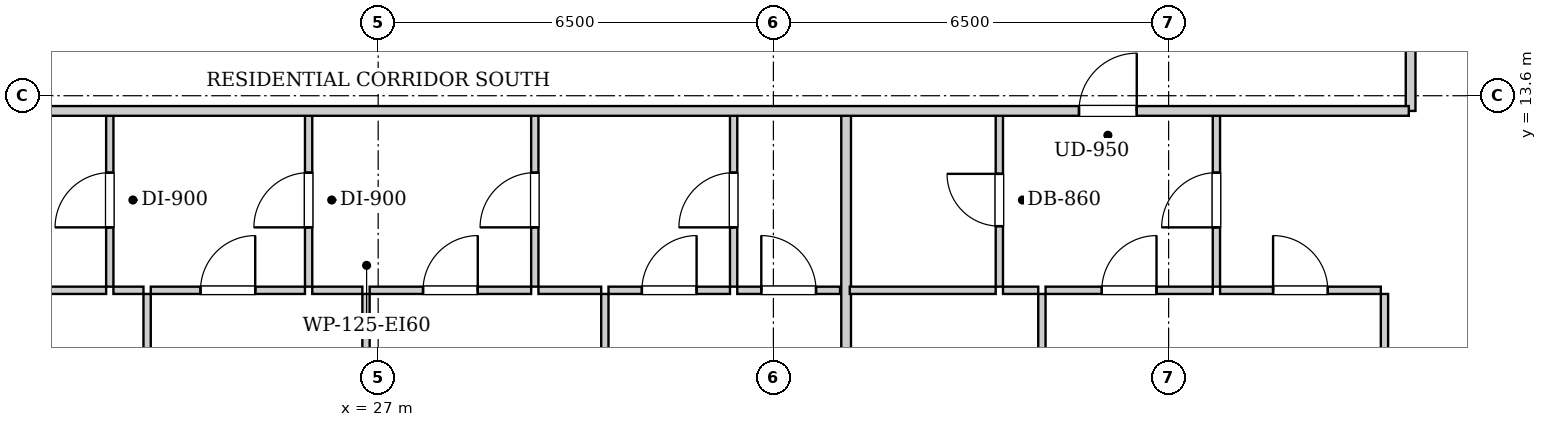
"""IFC4 building model, lengths in metres.
Left out: names, types, materials, properties, quantities, classifications, styles, units other than length and angle.
Written with IfcOpenShell. Run it as: python <this file> out.ifc"""

import sys

from ifc_helpers import new_model, si_unit, direction, frame, frame_2d, origin, place, context, subcontext, project, spatial, rectangle, extrude, element, fill, save


model = new_model("IFC4")
c1 = context("Model", 3, precision=1e-05, world=origin(), true_north=direction((0.0, 1.0)))
c2 = subcontext(c1, "Body", "Model", "MODEL_VIEW")
j1 = project(units=[si_unit("LENGTHUNIT", "METRE"), si_unit("PLANEANGLEUNIT", "RADIAN")], contexts=[c1])
p1 = place(None, origin())
s1 = spatial("IfcSite", under=j1, at=p1, CompositionType="ELEMENT")
p2 = place(p1, origin())
s2 = spatial("IfcBuilding", under=s1, at=p2, CompositionType="ELEMENT")
p3 = place(p2, frame((0.0, 0.0, 32.2)))
s3 = spatial("IfcBuildingStorey", under=s2, at=p3, CompositionType="ELEMENT", Elevation=32.2)
p4 = place(p3, frame((43.98, 13.35, 0.0), z_axis=(0.0, 0.0, 1.0), x_axis=(0.0, 1.0, 0.0)))
e1 = element("IfcWall", 1, at=p4, inside=s3, PredefinedType="PARTITIONING", context=c2, shape_type="SweptSolid", body=[
    extrude(rectangle(XDim=1.74, YDim=0.16, at=frame_2d((0.87, 0.0))), origin(), (0.0, 0.0, 1.0), 2.94),
])
p5 = place(p3, frame((22.586, 10.46, 0.0), z_axis=(0.0, 0.0, 1.0), x_axis=(0.0, 1.0, 0.0)))
e2 = element("IfcWall", 2, at=p5, inside=s3, PredefinedType="PARTITIONING", context=c2, shape_type="SweptSolid", body=[
    extrude(rectangle(XDim=2.85, YDim=0.12, at=frame_2d((1.425, 0.0))), origin(), (0.0, 0.0, 1.0), 2.94),
])
p6 = place(p5, frame((0.975, 0.0, 0.0)))
e3 = element("IfcOpeningElement", 3, at=p6, cuts=e2, PredefinedType="OPENING", context=c2, shape_type="SweptSolid", body=[
    extrude(rectangle(XDim=0.9, YDim=2.05, at=frame_2d((0.45, 1.025))), frame((0.0, 0.07, 0.0), z_axis=(0.0, -1.0, 0.0), x_axis=(1.0, 0.0, 0.0)), (0.0, 0.0, 1.0), 0.14),
])
p7 = place(p3, frame((18.086, 10.4, 0.0), z_axis=(0.0, 0.0, 1.0), x_axis=(1.0, 0.0, 0.0)))
e4 = element("IfcWall", 4, at=p7, inside=s3, PredefinedType="PARTITIONING", context=c2, shape_type="SweptSolid", body=[
    extrude(rectangle(XDim=4.44, YDim=0.12, at=frame_2d((2.22, 0.0))), origin(), (0.0, 0.0, 1.0), 2.94),
])
p8 = place(p7, frame((1.77, 0.0, 0.0)))
e5 = element("IfcOpeningElement", 5, at=p8, cuts=e4, PredefinedType="OPENING", context=c2, shape_type="SweptSolid", body=[
    extrude(rectangle(XDim=0.9, YDim=2.05, at=frame_2d((0.45, 1.025))), frame((0.0, 0.07, 0.0), z_axis=(0.0, -1.0, 0.0), x_axis=(1.0, 0.0, 0.0)), (0.0, 0.0, 1.0), 0.14),
])
p9 = place(p3, frame((25.856, 10.46, 0.0), z_axis=(0.0, 0.0, 1.0), x_axis=(0.0, 1.0, 0.0)))
e6 = element("IfcWall", 6, at=p9, inside=s3, PredefinedType="PARTITIONING", context=c2, shape_type="SweptSolid", body=[
    extrude(rectangle(XDim=2.85, YDim=0.12, at=frame_2d((1.425, 0.0))), origin(), (0.0, 0.0, 1.0), 2.94),
])
p10 = place(p9, frame((0.975, 0.0, 0.0)))
e7 = element("IfcOpeningElement", 7, at=p10, cuts=e6, PredefinedType="OPENING", context=c2, shape_type="SweptSolid", body=[
    extrude(rectangle(XDim=0.9, YDim=2.05, at=frame_2d((0.45, 1.025))), frame((0.0, 0.07, 0.0), z_axis=(0.0, -1.0, 0.0), x_axis=(1.0, 0.0, 0.0)), (0.0, 0.0, 1.0), 0.14),
])
p11 = place(p3, frame((22.646, 10.4, 0.0), z_axis=(0.0, 0.0, 1.0), x_axis=(1.0, 0.0, 0.0)))
e8 = element("IfcWall", 8, at=p11, inside=s3, PredefinedType="PARTITIONING", context=c2, shape_type="SweptSolid", body=[
    extrude(rectangle(XDim=0.494, YDim=0.12, at=frame_2d((0.247, 0.0))), origin(), (0.0, 0.0, 1.0), 2.94),
])
p12 = place(p3, frame((23.26, 10.4, 0.0), z_axis=(0.0, 0.0, 1.0), x_axis=(1.0, 0.0, 0.0)))
e9 = element("IfcWall", 9, at=p12, inside=s3, PredefinedType="PARTITIONING", context=c2, shape_type="SweptSolid", body=[
    extrude(rectangle(XDim=2.536, YDim=0.12, at=frame_2d((1.268, 0.0))), origin(), (0.0, 0.0, 1.0), 2.94),
])
p13 = place(p12, frame((0.818, 0.0, 0.0)))
e10 = element("IfcOpeningElement", 10, at=p13, cuts=e9, PredefinedType="OPENING", context=c2, shape_type="SweptSolid", body=[
    extrude(rectangle(XDim=0.9, YDim=2.05, at=frame_2d((0.45, 1.025))), frame((0.0, 0.07, 0.0), z_axis=(0.0, -1.0, 0.0), x_axis=(1.0, 0.0, 0.0)), (0.0, 0.0, 1.0), 0.14),
])
p14 = place(p3, frame((29.576, 10.46, 0.0), z_axis=(0.0, 0.0, 1.0), x_axis=(0.0, 1.0, 0.0)))
e11 = element("IfcWall", 11, at=p14, inside=s3, PredefinedType="PARTITIONING", context=c2, shape_type="SweptSolid", body=[
    extrude(rectangle(XDim=2.85, YDim=0.12, at=frame_2d((1.425, 0.0))), origin(), (0.0, 0.0, 1.0), 2.94),
])
p15 = place(p14, frame((0.975, 0.0, 0.0)))
e12 = element("IfcOpeningElement", 12, at=p15, cuts=e11, PredefinedType="OPENING", context=c2, shape_type="SweptSolid", body=[
    extrude(rectangle(XDim=0.9, YDim=2.05, at=frame_2d((0.45, 1.025))), frame((0.0, 0.07, 0.0), z_axis=(0.0, -1.0, 0.0), x_axis=(1.0, 0.0, 0.0)), (0.0, 0.0, 1.0), 0.14),
])
p16 = place(p3, frame((25.916, 10.4, 0.0), z_axis=(0.0, 0.0, 1.0), x_axis=(1.0, 0.0, 0.0)))
e13 = element("IfcWall", 13, at=p16, inside=s3, PredefinedType="PARTITIONING", context=c2, shape_type="SweptSolid", body=[
    extrude(rectangle(XDim=0.824, YDim=0.12, at=frame_2d((0.412, 0.0))), origin(), (0.0, 0.0, 1.0), 2.94),
])
p17 = place(p3, frame((26.86, 10.4, 0.0), z_axis=(0.0, 0.0, 1.0), x_axis=(1.0, 0.0, 0.0)))
e14 = element("IfcWall", 14, at=p17, inside=s3, PredefinedType="PARTITIONING", context=c2, shape_type="SweptSolid", body=[
    extrude(rectangle(XDim=2.656, YDim=0.12, at=frame_2d((1.328, 0.0))), origin(), (0.0, 0.0, 1.0), 2.94),
])
p18 = place(p17, frame((0.878, 0.0, 0.0)))
e15 = element("IfcOpeningElement", 15, at=p18, cuts=e14, PredefinedType="OPENING", context=c2, shape_type="SweptSolid", body=[
    extrude(rectangle(XDim=0.9, YDim=2.05, at=frame_2d((0.45, 1.025))), frame((0.0, 0.07, 0.0), z_axis=(0.0, -1.0, 0.0), x_axis=(1.0, 0.0, 0.0)), (0.0, 0.0, 1.0), 0.14),
])
p19 = place(p3, frame((32.846, 10.46, 0.0), z_axis=(0.0, 0.0, 1.0), x_axis=(0.0, 1.0, 0.0)))
e16 = element("IfcWall", 16, at=p19, inside=s3, PredefinedType="PARTITIONING", context=c2, shape_type="SweptSolid", body=[
    extrude(rectangle(XDim=2.85, YDim=0.12, at=frame_2d((1.425, 0.0))), origin(), (0.0, 0.0, 1.0), 2.94),
])
p20 = place(p19, frame((0.975, 0.0, 0.0)))
e17 = element("IfcOpeningElement", 17, at=p20, cuts=e16, PredefinedType="OPENING", context=c2, shape_type="SweptSolid", body=[
    extrude(rectangle(XDim=0.9, YDim=2.05, at=frame_2d((0.45, 1.025))), frame((0.0, 0.07, 0.0), z_axis=(0.0, -1.0, 0.0), x_axis=(1.0, 0.0, 0.0)), (0.0, 0.0, 1.0), 0.14),
])
p21 = place(p3, frame((29.636, 10.4, 0.0), z_axis=(0.0, 0.0, 1.0), x_axis=(1.0, 0.0, 0.0)))
e18 = element("IfcWall", 18, at=p21, inside=s3, PredefinedType="PARTITIONING", context=c2, shape_type="SweptSolid", body=[
    extrude(rectangle(XDim=1.032, YDim=0.12, at=frame_2d((0.516, 0.0))), origin(), (0.0, 0.0, 1.0), 2.94),
])
p22 = place(p3, frame((30.788, 10.4, 0.0), z_axis=(0.0, 0.0, 1.0), x_axis=(1.0, 0.0, 0.0)))
e19 = element("IfcWall", 19, at=p22, inside=s3, PredefinedType="PARTITIONING", context=c2, shape_type="SweptSolid", body=[
    extrude(rectangle(XDim=1.998, YDim=0.12, at=frame_2d((0.999, 0.0))), origin(), (0.0, 0.0, 1.0), 2.94),
])
p23 = place(p22, frame((0.549, 0.0, 0.0)))
e20 = element("IfcOpeningElement", 20, at=p23, cuts=e19, PredefinedType="OPENING", context=c2, shape_type="SweptSolid", body=[
    extrude(rectangle(XDim=0.9, YDim=2.05, at=frame_2d((0.45, 1.025))), frame((0.0, 0.07, 0.0), z_axis=(0.0, -1.0, 0.0), x_axis=(1.0, 0.0, 0.0)), (0.0, 0.0, 1.0), 0.14),
])
p24 = place(p3, frame((32.906, 10.4, 0.0), z_axis=(0.0, 0.0, 1.0), x_axis=(1.0, 0.0, 0.0)))
e21 = element("IfcWall", 21, at=p24, inside=s3, PredefinedType="PARTITIONING", context=c2, shape_type="SweptSolid", body=[
    extrude(rectangle(XDim=1.69, YDim=0.12, at=frame_2d((0.845, 0.0))), origin(), (0.0, 0.0, 1.0), 2.94),
])
p25 = place(p24, frame((0.395, 0.0, 0.0)))
e22 = element("IfcOpeningElement", 22, at=p25, cuts=e21, PredefinedType="OPENING", context=c2, shape_type="SweptSolid", body=[
    extrude(rectangle(XDim=0.9, YDim=2.05, at=frame_2d((0.45, 1.025))), frame((0.0, 0.07, 0.0), z_axis=(0.0, -1.0, 0.0), x_axis=(1.0, 0.0, 0.0)), (0.0, 0.0, 1.0), 0.14),
])
p26 = place(p3, frame((23.2, 0.28, 0.0), z_axis=(0.0, 0.0, 1.0), x_axis=(0.0, 1.0, 0.0)))
e23 = element("IfcWall", 23, at=p26, inside=s3, PredefinedType="PARTITIONING", context=c2, shape_type="SweptSolid", body=[
    extrude(rectangle(XDim=10.06, YDim=0.12, at=frame_2d((5.03, 0.0))), origin(), (0.0, 0.0, 1.0), 2.94),
])
p27 = place(p26, frame((4.565, 0.0, 0.0)))
e24 = element("IfcOpeningElement", 24, at=p27, cuts=e23, PredefinedType="OPENING", context=c2, shape_type="SweptSolid", body=[
    extrude(rectangle(XDim=0.9, YDim=2.05, at=frame_2d((0.45, 1.025))), frame((0.0, 0.07, 0.0), z_axis=(0.0, -1.0, 0.0), x_axis=(1.0, 0.0, 0.0)), (0.0, 0.0, 1.0), 0.14),
])
p28 = place(p3, frame((26.8, 0.28, 0.0), z_axis=(0.0, 0.0, 1.0), x_axis=(0.0, 1.0, 0.0)))
e25 = element("IfcWall", 25, at=p28, inside=s3, PredefinedType="PARTITIONING", context=c2, shape_type="SweptSolid", body=[
    extrude(rectangle(XDim=10.06, YDim=0.12, at=frame_2d((5.03, 0.0))), origin(), (0.0, 0.0, 1.0), 2.94),
])
p29 = place(p28, frame((4.565, 0.0, 0.0)))
e26 = element("IfcOpeningElement", 26, at=p29, cuts=e25, PredefinedType="OPENING", context=c2, shape_type="SweptSolid", body=[
    extrude(rectangle(XDim=0.9, YDim=2.05, at=frame_2d((0.45, 1.025))), frame((0.0, 0.07, 0.0), z_axis=(0.0, -1.0, 0.0), x_axis=(1.0, 0.0, 0.0)), (0.0, 0.0, 1.0), 0.14),
])
p30 = place(p3, frame((30.728, 0.28, 0.0), z_axis=(0.0, 0.0, 1.0), x_axis=(0.0, 1.0, 0.0)))
e27 = element("IfcWall", 27, at=p30, inside=s3, PredefinedType="PARTITIONING", context=c2, shape_type="SweptSolid", body=[
    extrude(rectangle(XDim=10.06, YDim=0.12, at=frame_2d((5.03, 0.0))), origin(), (0.0, 0.0, 1.0), 2.94),
])
p31 = place(p30, frame((4.565, 0.0, 0.0)))
e28 = element("IfcOpeningElement", 28, at=p31, cuts=e27, PredefinedType="OPENING", context=c2, shape_type="SweptSolid", body=[
    extrude(rectangle(XDim=0.9, YDim=2.05, at=frame_2d((0.45, 1.025))), frame((0.0, 0.07, 0.0), z_axis=(0.0, -1.0, 0.0), x_axis=(1.0, 0.0, 0.0)), (0.0, 0.0, 1.0), 0.14),
])
p32 = place(p3, frame((34.696, 0.28, 0.0), z_axis=(0.0, 0.0, 1.0), x_axis=(0.0, 1.0, 0.0)))
e29 = element("IfcWall", 29, at=p32, inside=s3, PredefinedType="PARTITIONING", context=c2, shape_type="SweptSolid", body=[
    extrude(rectangle(XDim=13.03, YDim=0.16, at=frame_2d((6.515, 0.0))), origin(), (0.0, 0.0, 1.0), 2.94),
])
p33 = place(p3, frame((37.216, 10.46, 0.0), z_axis=(0.0, 0.0, 1.0), x_axis=(0.0, 1.0, 0.0)))
e30 = element("IfcWall", 30, at=p33, inside=s3, PredefinedType="PARTITIONING", context=c2, shape_type="SweptSolid", body=[
    extrude(rectangle(XDim=2.85, YDim=0.12, at=frame_2d((1.425, 0.0))), origin(), (0.0, 0.0, 1.0), 2.94),
])
p34 = place(p33, frame((0.995, 0.0, 0.0)))
e31 = element("IfcOpeningElement", 31, at=p34, cuts=e30, PredefinedType="OPENING", context=c2, shape_type="SweptSolid", body=[
    extrude(rectangle(XDim=0.86, YDim=2.05, at=frame_2d((0.43, 1.025))), frame((0.0, 0.07, 0.0), z_axis=(0.0, -1.0, 0.0), x_axis=(1.0, 0.0, 0.0)), (0.0, 0.0, 1.0), 0.14),
])
p35 = place(p3, frame((34.756, 10.4, 0.0), z_axis=(0.0, 0.0, 1.0), x_axis=(1.0, 0.0, 0.0)))
e32 = element("IfcWall", 32, at=p35, inside=s3, PredefinedType="PARTITIONING", context=c2, shape_type="SweptSolid", body=[
    extrude(rectangle(XDim=2.4, YDim=0.12, at=frame_2d((1.2, 0.0))), origin(), (0.0, 0.0, 1.0), 2.94),
])
p36 = place(p3, frame((40.786, 10.46, 0.0), z_axis=(0.0, 0.0, 1.0), x_axis=(0.0, 1.0, 0.0)))
e33 = element("IfcWall", 33, at=p36, inside=s3, PredefinedType="PARTITIONING", context=c2, shape_type="SweptSolid", body=[
    extrude(rectangle(XDim=2.85, YDim=0.12, at=frame_2d((1.425, 0.0))), origin(), (0.0, 0.0, 1.0), 2.94),
])
p37 = place(p36, frame((0.975, 0.0, 0.0)))
e34 = element("IfcOpeningElement", 34, at=p37, cuts=e33, PredefinedType="OPENING", context=c2, shape_type="SweptSolid", body=[
    extrude(rectangle(XDim=0.9, YDim=2.05, at=frame_2d((0.45, 1.025))), frame((0.0, 0.07, 0.0), z_axis=(0.0, -1.0, 0.0), x_axis=(1.0, 0.0, 0.0)), (0.0, 0.0, 1.0), 0.14),
])
p38 = place(p3, frame((37.276, 10.4, 0.0), z_axis=(0.0, 0.0, 1.0), x_axis=(1.0, 0.0, 0.0)))
e35 = element("IfcWall", 35, at=p38, inside=s3, PredefinedType="PARTITIONING", context=c2, shape_type="SweptSolid", body=[
    extrude(rectangle(XDim=0.58, YDim=0.12, at=frame_2d((0.29, 0.0))), origin(), (0.0, 0.0, 1.0), 2.94),
])
p39 = place(p3, frame((37.976, 10.4, 0.0), z_axis=(0.0, 0.0, 1.0), x_axis=(1.0, 0.0, 0.0)))
e36 = element("IfcWall", 36, at=p39, inside=s3, PredefinedType="PARTITIONING", context=c2, shape_type="SweptSolid", body=[
    extrude(rectangle(XDim=2.75, YDim=0.12, at=frame_2d((1.375, 0.0))), origin(), (0.0, 0.0, 1.0), 2.94),
])
p40 = place(p39, frame((0.925, 0.0, 0.0)))
e37 = element("IfcOpeningElement", 37, at=p40, cuts=e36, PredefinedType="OPENING", context=c2, shape_type="SweptSolid", body=[
    extrude(rectangle(XDim=0.9, YDim=2.05, at=frame_2d((0.45, 1.025))), frame((0.0, 0.07, 0.0), z_axis=(0.0, -1.0, 0.0), x_axis=(1.0, 0.0, 0.0)), (0.0, 0.0, 1.0), 0.14),
])
p41 = place(p3, frame((40.846, 10.4, 0.0), z_axis=(0.0, 0.0, 1.0), x_axis=(1.0, 0.0, 0.0)))
e38 = element("IfcWall", 38, at=p41, inside=s3, PredefinedType="PARTITIONING", context=c2, shape_type="SweptSolid", body=[
    extrude(rectangle(XDim=2.644, YDim=0.12, at=frame_2d((1.322, 0.0))), origin(), (0.0, 0.0, 1.0), 2.94),
])
p42 = place(p41, frame((0.872, 0.0, 0.0)))
e39 = element("IfcOpeningElement", 39, at=p42, cuts=e38, PredefinedType="OPENING", context=c2, shape_type="SweptSolid", body=[
    extrude(rectangle(XDim=0.9, YDim=2.05, at=frame_2d((0.45, 1.025))), frame((0.0, 0.07, 0.0), z_axis=(0.0, -1.0, 0.0), x_axis=(1.0, 0.0, 0.0)), (0.0, 0.0, 1.0), 0.14),
])
p43 = place(p3, frame((37.916, 0.28, 0.0), z_axis=(0.0, 0.0, 1.0), x_axis=(0.0, 1.0, 0.0)))
e40 = element("IfcWall", 40, at=p43, inside=s3, PredefinedType="PARTITIONING", context=c2, shape_type="SweptSolid", body=[
    extrude(rectangle(XDim=10.06, YDim=0.12, at=frame_2d((5.03, 0.0))), origin(), (0.0, 0.0, 1.0), 2.94),
])
p44 = place(p43, frame((4.565, 0.0, 0.0)))
e41 = element("IfcOpeningElement", 41, at=p44, cuts=e40, PredefinedType="OPENING", context=c2, shape_type="SweptSolid", body=[
    extrude(rectangle(XDim=0.9, YDim=2.05, at=frame_2d((0.45, 1.025))), frame((0.0, 0.07, 0.0), z_axis=(0.0, -1.0, 0.0), x_axis=(1.0, 0.0, 0.0)), (0.0, 0.0, 1.0), 0.14),
])
p45 = place(p3, frame((43.55, 0.28, 0.0), z_axis=(0.0, 0.0, 1.0), x_axis=(0.0, 1.0, 0.0)))
e42 = element("IfcWall", 42, at=p45, inside=s3, PredefinedType="PARTITIONING", context=c2, shape_type="SweptSolid", body=[
    extrude(rectangle(XDim=10.06, YDim=0.12, at=frame_2d((5.03, 0.0))), origin(), (0.0, 0.0, 1.0), 2.94),
])
p46 = place(p45, frame((4.565, 0.0, 0.0)))
e43 = element("IfcOpeningElement", 43, at=p46, cuts=e42, PredefinedType="OPENING", context=c2, shape_type="SweptSolid", body=[
    extrude(rectangle(XDim=0.9, YDim=2.05, at=frame_2d((0.45, 1.025))), frame((0.0, 0.07, 0.0), z_axis=(0.0, -1.0, 0.0), x_axis=(1.0, 0.0, 0.0)), (0.0, 0.0, 1.0), 0.14),
])
p47 = place(p3, frame((10.05, 13.35, 0.0), z_axis=(0.0, 0.0, 1.0), x_axis=(1.0, 0.0, 0.0)))
e44 = element("IfcWall", 44, at=p47, inside=s3, PredefinedType="PARTITIONING", context=c2, shape_type="SweptSolid", body=[
    extrude(rectangle(XDim=33.9, YDim=0.16, at=frame_2d((16.95, 0.0))), origin(), (0.0, 0.0, 1.0), 2.94),
])
p48 = place(p47, frame((3.203, 0.0, 0.0)))
e45 = element("IfcOpeningElement", 45, at=p48, cuts=e44, PredefinedType="OPENING", context=c2, shape_type="SweptSolid", body=[
    extrude(rectangle(XDim=0.95, YDim=2.1, at=frame_2d((0.475, 1.05))), frame((0.0, 0.09, 0.0), z_axis=(0.0, -1.0, 0.0), x_axis=(1.0, 0.0, 0.0)), (0.0, 0.0, 1.0), 0.18),
])
p49 = place(p47, frame((9.39, 0.0, 0.0)))
e46 = element("IfcOpeningElement", 46, at=p49, cuts=e44, PredefinedType="OPENING", context=c2, shape_type="SweptSolid", body=[
    extrude(rectangle(XDim=0.95, YDim=2.1, at=frame_2d((0.475, 1.05))), frame((0.0, 0.09, 0.0), z_axis=(0.0, -1.0, 0.0), x_axis=(1.0, 0.0, 0.0)), (0.0, 0.0, 1.0), 0.18),
])
p50 = place(p47, frame((28.476, 0.0, 0.0)))
e47 = element("IfcOpeningElement", 47, at=p50, cuts=e44, PredefinedType="OPENING", context=c2, shape_type="SweptSolid", body=[
    extrude(rectangle(XDim=0.95, YDim=2.1, at=frame_2d((0.475, 1.05))), frame((0.0, 0.09, 0.0), z_axis=(0.0, -1.0, 0.0), x_axis=(1.0, 0.0, 0.0)), (0.0, 0.0, 1.0), 0.18),
])
p51 = place(p6, origin())
e48 = element("IfcDoor", 48, at=p51, inside=s3, OperationType="SINGLE_SWING_LEFT", PredefinedType="DOOR", context=c2, shape_type="SweptSolid", body=[
    extrude(rectangle(XDim=0.9, YDim=2.05, at=frame_2d((0.45, 1.025))), frame((0.0, 0.025, 0.0), z_axis=(0.0, -1.0, 0.0), x_axis=(1.0, 0.0, 0.0)), (0.0, 0.0, 1.0), 0.05),
])
fill(e3, e48)
p52 = place(p10, origin())
e49 = element("IfcDoor", 49, at=p52, inside=s3, OperationType="SINGLE_SWING_LEFT", PredefinedType="DOOR", context=c2, shape_type="SweptSolid", body=[
    extrude(rectangle(XDim=0.9, YDim=2.05, at=frame_2d((0.45, 1.025))), frame((0.0, 0.025, 0.0), z_axis=(0.0, -1.0, 0.0), x_axis=(1.0, 0.0, 0.0)), (0.0, 0.0, 1.0), 0.05),
])
fill(e7, e49)
p53 = place(p13, origin())
e50 = element("IfcDoor", 50, at=p53, inside=s3, OperationType="SINGLE_SWING_RIGHT", PredefinedType="DOOR", context=c2, shape_type="SweptSolid", body=[
    extrude(rectangle(XDim=0.9, YDim=2.05, at=frame_2d((0.45, 1.025))), frame((0.0, 0.025, 0.0), z_axis=(0.0, -1.0, 0.0), x_axis=(1.0, 0.0, 0.0)), (0.0, 0.0, 1.0), 0.05),
])
fill(e10, e50)
p54 = place(p15, origin())
e51 = element("IfcDoor", 51, at=p54, inside=s3, OperationType="SINGLE_SWING_LEFT", PredefinedType="DOOR", context=c2, shape_type="SweptSolid", body=[
    extrude(rectangle(XDim=0.9, YDim=2.05, at=frame_2d((0.45, 1.025))), frame((0.0, 0.025, 0.0), z_axis=(0.0, -1.0, 0.0), x_axis=(1.0, 0.0, 0.0)), (0.0, 0.0, 1.0), 0.05),
])
fill(e12, e51)
p55 = place(p18, origin())
e52 = element("IfcDoor", 52, at=p55, inside=s3, OperationType="SINGLE_SWING_RIGHT", PredefinedType="DOOR", context=c2, shape_type="SweptSolid", body=[
    extrude(rectangle(XDim=0.9, YDim=2.05, at=frame_2d((0.45, 1.025))), frame((0.0, 0.025, 0.0), z_axis=(0.0, -1.0, 0.0), x_axis=(1.0, 0.0, 0.0)), (0.0, 0.0, 1.0), 0.05),
])
fill(e15, e52)
p56 = place(p20, origin())
e53 = element("IfcDoor", 53, at=p56, inside=s3, OperationType="SINGLE_SWING_LEFT", PredefinedType="DOOR", context=c2, shape_type="SweptSolid", body=[
    extrude(rectangle(XDim=0.9, YDim=2.05, at=frame_2d((0.45, 1.025))), frame((0.0, 0.025, 0.0), z_axis=(0.0, -1.0, 0.0), x_axis=(1.0, 0.0, 0.0)), (0.0, 0.0, 1.0), 0.05),
])
fill(e17, e53)
p57 = place(p23, origin())
e54 = element("IfcDoor", 54, at=p57, inside=s3, OperationType="SINGLE_SWING_RIGHT", PredefinedType="DOOR", context=c2, shape_type="SweptSolid", body=[
    extrude(rectangle(XDim=0.9, YDim=2.05, at=frame_2d((0.45, 1.025))), frame((0.0, 0.025, 0.0), z_axis=(0.0, -1.0, 0.0), x_axis=(1.0, 0.0, 0.0)), (0.0, 0.0, 1.0), 0.05),
])
fill(e20, e54)
p58 = place(p25, origin())
e55 = element("IfcDoor", 55, at=p58, inside=s3, OperationType="SINGLE_SWING_LEFT", PredefinedType="DOOR", context=c2, shape_type="SweptSolid", body=[
    extrude(rectangle(XDim=0.9, YDim=2.05, at=frame_2d((0.45, 1.025))), frame((0.0, 0.025, 0.0), z_axis=(0.0, -1.0, 0.0), x_axis=(1.0, 0.0, 0.0)), (0.0, 0.0, 1.0), 0.05),
])
fill(e22, e55)
p59 = place(p34, origin())
e56 = element("IfcDoor", 56, at=p59, inside=s3, OperationType="SINGLE_SWING_RIGHT", PredefinedType="DOOR", context=c2, shape_type="SweptSolid", body=[
    extrude(rectangle(XDim=0.86, YDim=2.05, at=frame_2d((0.43, 1.025))), frame((0.0, 0.025, 0.0), z_axis=(0.0, -1.0, 0.0), x_axis=(1.0, 0.0, 0.0)), (0.0, 0.0, 1.0), 0.05),
])
fill(e31, e56)
p60 = place(p37, origin())
e57 = element("IfcDoor", 57, at=p60, inside=s3, OperationType="SINGLE_SWING_LEFT", PredefinedType="DOOR", context=c2, shape_type="SweptSolid", body=[
    extrude(rectangle(XDim=0.9, YDim=2.05, at=frame_2d((0.45, 1.025))), frame((0.0, 0.025, 0.0), z_axis=(0.0, -1.0, 0.0), x_axis=(1.0, 0.0, 0.0)), (0.0, 0.0, 1.0), 0.05),
])
fill(e34, e57)
p61 = place(p40, origin())
e58 = element("IfcDoor", 58, at=p61, inside=s3, OperationType="SINGLE_SWING_RIGHT", PredefinedType="DOOR", context=c2, shape_type="SweptSolid", body=[
    extrude(rectangle(XDim=0.9, YDim=2.05, at=frame_2d((0.45, 1.025))), frame((0.0, 0.025, 0.0), z_axis=(0.0, -1.0, 0.0), x_axis=(1.0, 0.0, 0.0)), (0.0, 0.0, 1.0), 0.05),
])
fill(e37, e58)
p62 = place(p42, origin())
e59 = element("IfcDoor", 59, at=p62, inside=s3, OperationType="SINGLE_SWING_LEFT", PredefinedType="DOOR", context=c2, shape_type="SweptSolid", body=[
    extrude(rectangle(XDim=0.9, YDim=2.05, at=frame_2d((0.45, 1.025))), frame((0.0, 0.025, 0.0), z_axis=(0.0, -1.0, 0.0), x_axis=(1.0, 0.0, 0.0)), (0.0, 0.0, 1.0), 0.05),
])
fill(e39, e59)
p63 = place(p50, origin())
e60 = element("IfcDoor", 60, at=p63, inside=s3, OperationType="SINGLE_SWING_RIGHT", PredefinedType="DOOR", context=c2, shape_type="SweptSolid", body=[
    extrude(rectangle(XDim=0.95, YDim=2.1, at=frame_2d((0.475, 1.05))), frame((0.0, 0.025, 0.0), z_axis=(0.0, -1.0, 0.0), x_axis=(1.0, 0.0, 0.0)), (0.0, 0.0, 1.0), 0.05),
])
fill(e47, e60)
save(model, sys.argv[1])
